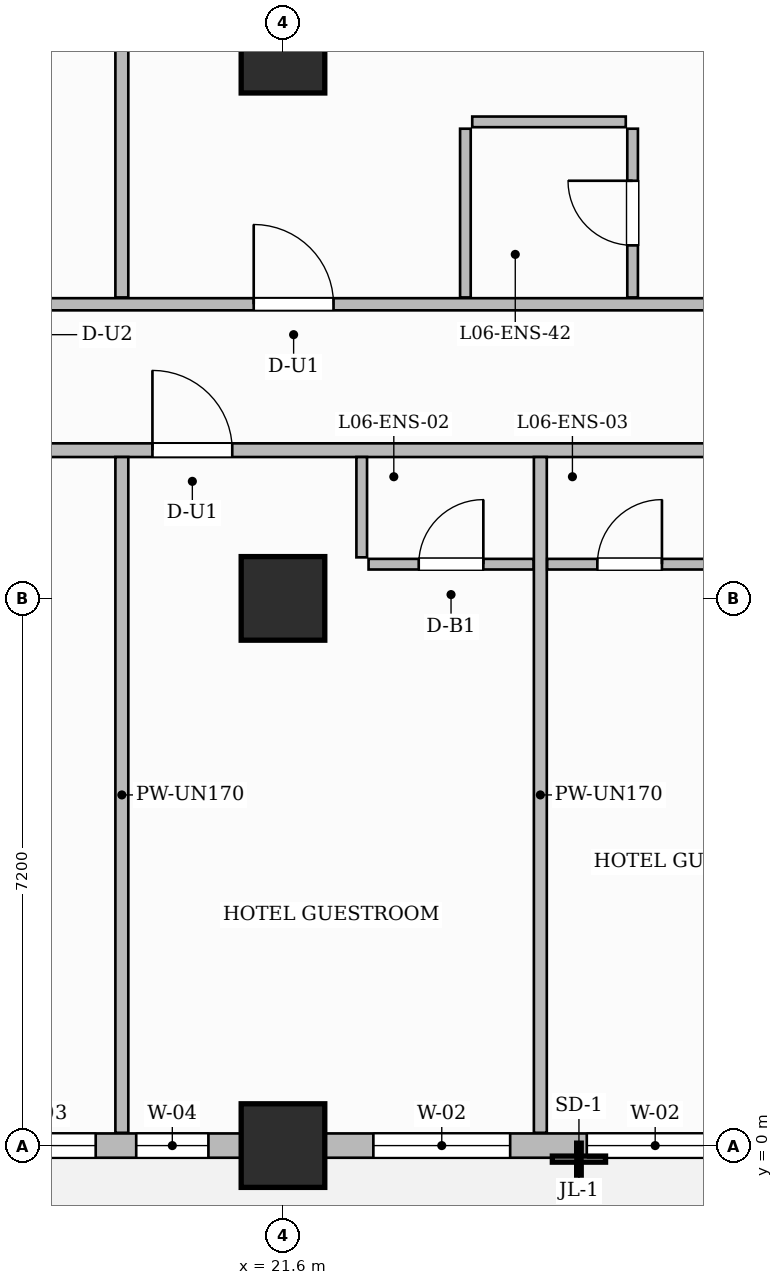
"""IFC4 building model, lengths in metres.
Left out: names, types, materials, properties, quantities, classifications, styles, units other than length and angle.
Written with IfcOpenShell. Run it as: python <this file> out.ifc"""

import sys

from ifc_helpers import new_model, si_unit, direction, frame, frame_2d, origin, origin_2d, place, context, subcontext, project, spatial, rectangle, extrude, source, transform, mapped, element, fill, save


model = new_model("IFC4")
c1 = context("Model", 3, precision=1e-05, world=origin(), true_north=direction((0.0, 1.0)))
c2 = subcontext(c1, "Body", "Model", "MODEL_VIEW")
j1 = project(units=[si_unit("LENGTHUNIT", "METRE"), si_unit("PLANEANGLEUNIT", "RADIAN")], contexts=[c1])
p1 = place(None, origin())
s1 = spatial("IfcSite", under=j1, at=p1, CompositionType="ELEMENT")
p2 = place(p1, origin())
s2 = spatial("IfcBuilding", under=s1, at=p2, CompositionType="ELEMENT")
p3 = place(p2, frame((0.0, 0.0, 32.4)))
s3 = spatial("IfcBuildingStorey", under=s2, at=p3, CompositionType="ELEMENT", Elevation=32.4)
m1 = source(origin(), c2, "Body", "SweptSolid", [
    extrude(rectangle(XDim=1.1, YDim=1.1, at=origin_2d()), origin(), (0.0, 0.0, 1.0), 3.7),
])
for number, where, z_axis, x_axis in (
    (1, (21.6, 0.0, 0.0), (0.0, 0.0, 1.0), (1.0, 0.0, 0.0)),
    (2, (21.6, 7.2, 0.0), (0.0, 0.0, 1.0), (1.0, 0.0, 0.0)),
    (3, (21.6, 14.4, 0.0), (0.0, 0.0, 1.0), (1.0, 0.0, 0.0)),
):
    element("IfcColumn", number, at=place(p3, frame(where, z_axis=z_axis, x_axis=x_axis)), inside=s3, PredefinedType="COLUMN", context=c2, shape_type="MappedRepresentation", body=[
        mapped(m1, transform((0.0, 0.0, 0.0), scale=1.0)),
    ])
p4 = place(p3, frame((14.568, 9.15, 0.0), z_axis=(0.0, 0.0, 1.0), x_axis=(1.0, 0.0, 0.0)))
e4 = element("IfcWall", 4, at=p4, inside=s3, PredefinedType="PARTITIONING", context=c2, shape_type="SweptSolid", body=[
    extrude(rectangle(XDim=15.542, YDim=0.18, at=frame_2d((7.771, 0.0))), origin(), (0.0, 0.0, 1.0), 3.45),
])
p5 = place(p4, frame((2.888, 0.0, 0.0)))
e5 = element("IfcOpeningElement", 5, at=p5, cuts=e4, PredefinedType="OPENING", context=c2, shape_type="SweptSolid", body=[
    extrude(rectangle(XDim=1.0, YDim=2.2, at=frame_2d((0.5, 1.1))), frame((0.0, 0.1, 0.0), z_axis=(0.0, -1.0, 0.0), x_axis=(1.0, 0.0, 0.0)), (0.0, 0.0, 1.0), 0.2),
])
p6 = place(p4, frame((5.314, 0.0, 0.0)))
e6 = element("IfcOpeningElement", 6, at=p6, cuts=e4, PredefinedType="OPENING", context=c2, shape_type="SweptSolid", body=[
    extrude(rectangle(XDim=1.05, YDim=2.25, at=frame_2d((0.525, 1.125))), frame((0.0, 0.1, 0.0), z_axis=(0.0, -1.0, 0.0), x_axis=(1.0, 0.0, 0.0)), (0.0, 0.0, 1.0), 0.2),
])
p7 = place(p4, frame((13.7, 0.0, 0.0)))
e7 = element("IfcOpeningElement", 7, at=p7, cuts=e4, PredefinedType="OPENING", context=c2, shape_type="SweptSolid", body=[
    extrude(rectangle(XDim=1.0, YDim=2.2, at=frame_2d((0.5, 1.1))), frame((0.0, 0.1, 0.0), z_axis=(0.0, -1.0, 0.0), x_axis=(1.0, 0.0, 0.0)), (0.0, 0.0, 1.0), 0.2),
])
p8 = place(p3, frame((14.568, 11.07, 0.0), z_axis=(0.0, 0.0, 1.0), x_axis=(1.0, 0.0, 0.0)))
e8 = element("IfcWall", 8, at=p8, inside=s3, PredefinedType="PARTITIONING", context=c2, shape_type="SweptSolid", body=[
    extrude(rectangle(XDim=15.542, YDim=0.16, at=frame_2d((7.771, 0.0))), origin(), (0.0, 0.0, 1.0), 3.45),
])
p9 = place(p8, frame((2.918, 0.0, 0.0)))
e9 = element("IfcOpeningElement", 9, at=p9, cuts=e8, PredefinedType="OPENING", context=c2, shape_type="SweptSolid", body=[
    extrude(rectangle(XDim=1.0, YDim=2.2, at=frame_2d((0.5, 1.1))), frame((0.0, 0.09, 0.0), z_axis=(0.0, -1.0, 0.0), x_axis=(1.0, 0.0, 0.0)), (0.0, 0.0, 1.0), 0.18),
])
p10 = place(p8, frame((6.647, 0.0, 0.0)))
e10 = element("IfcOpeningElement", 10, at=p10, cuts=e8, PredefinedType="OPENING", context=c2, shape_type="SweptSolid", body=[
    extrude(rectangle(XDim=1.05, YDim=2.25, at=frame_2d((0.525, 1.125))), frame((0.0, 0.09, 0.0), z_axis=(0.0, -1.0, 0.0), x_axis=(1.0, 0.0, 0.0)), (0.0, 0.0, 1.0), 0.18),
])
p11 = place(p3, frame((19.48, 0.168, 0.0), z_axis=(0.0, 0.0, 1.0), x_axis=(0.0, 1.0, 0.0)))
e11 = element("IfcWall", 11, at=p11, inside=s3, PredefinedType="PARTITIONING", context=c2, shape_type="SweptSolid", body=[
    extrude(rectangle(XDim=8.892, YDim=0.17, at=frame_2d((4.446, 0.0))), origin(), (0.0, 0.0, 1.0), 3.45),
])
p12 = place(p3, frame((24.986, 0.168, 0.0), z_axis=(0.0, 0.0, 1.0), x_axis=(0.0, 1.0, 0.0)))
e12 = element("IfcWall", 12, at=p12, inside=s3, PredefinedType="PARTITIONING", context=c2, shape_type="SweptSolid", body=[
    extrude(rectangle(XDim=8.892, YDim=0.17, at=frame_2d((4.446, 0.0))), origin(), (0.0, 0.0, 1.0), 3.035),
])
p13 = place(p3, frame((22.636, 7.74, 0.0), z_axis=(0.0, 0.0, 1.0), x_axis=(0.0, 1.0, 0.0)))
e13 = element("IfcWall", 13, at=p13, inside=s3, PredefinedType="PARTITIONING", context=c2, shape_type="SweptSolid", body=[
    extrude(rectangle(XDim=1.32, YDim=0.14, at=frame_2d((0.66, 0.0))), origin(), (0.0, 0.0, 1.0), 3.45),
])
p14 = place(p3, frame((22.726, 7.65, 0.0), z_axis=(0.0, 0.0, 1.0), x_axis=(1.0, 0.0, 0.0)))
e14 = element("IfcWall", 14, at=p14, inside=s3, PredefinedType="PARTITIONING", context=c2, shape_type="SweptSolid", body=[
    extrude(rectangle(XDim=2.17, YDim=0.14, at=frame_2d((1.085, 0.0))), origin(), (0.0, 0.0, 1.0), 3.45),
])
p15 = place(p14, frame((0.66, 0.0, 0.0)))
e15 = element("IfcOpeningElement", 15, at=p15, cuts=e14, PredefinedType="OPENING", context=c2, shape_type="SweptSolid", body=[
    extrude(rectangle(XDim=0.85, YDim=2.1, at=frame_2d((0.425, 1.05))), frame((0.0, 0.08, 0.0), z_axis=(0.0, -1.0, 0.0), x_axis=(1.0, 0.0, 0.0)), (0.0, 0.0, 1.0), 0.16),
])
p16 = place(p3, frame((25.076, 7.65, 0.0), z_axis=(0.0, 0.0, 1.0), x_axis=(1.0, 0.0, 0.0)))
e16 = element("IfcWall", 16, at=p16, inside=s3, PredefinedType="PARTITIONING", context=c2, shape_type="SweptSolid", body=[
    extrude(rectangle(XDim=2.17, YDim=0.14, at=frame_2d((1.085, 0.0))), origin(), (0.0, 0.0, 1.0), 3.45),
])
p17 = place(p16, frame((0.66, 0.0, 0.0)))
e17 = element("IfcOpeningElement", 17, at=p17, cuts=e16, PredefinedType="OPENING", context=c2, shape_type="SweptSolid", body=[
    extrude(rectangle(XDim=0.85, YDim=2.1, at=frame_2d((0.425, 1.05))), frame((0.0, 0.08, 0.0), z_axis=(0.0, -1.0, 0.0), x_axis=(1.0, 0.0, 0.0)), (0.0, 0.0, 1.0), 0.16),
])
p18 = place(p3, frame((19.48, 11.16, 0.0), z_axis=(0.0, 0.0, 1.0), x_axis=(0.0, 1.0, 0.0)))
e18 = element("IfcWall", 18, at=p18, inside=s3, PredefinedType="PARTITIONING", context=c2, shape_type="SweptSolid", body=[
    extrude(rectangle(XDim=10.272, YDim=0.17, at=frame_2d((5.136, 0.0))), origin(), (0.0, 0.0, 1.0), 3.45),
])
p19 = place(p3, frame((24.0, 11.16, 0.0), z_axis=(0.0, 0.0, 1.0), x_axis=(0.0, 1.0, 0.0)))
e19 = element("IfcWall", 19, at=p19, inside=s3, PredefinedType="PARTITIONING", context=c2, shape_type="SweptSolid", body=[
    extrude(rectangle(XDim=2.22, YDim=0.14, at=frame_2d((1.11, 0.0))), origin(), (0.0, 0.0, 1.0), 3.45),
])
p20 = place(p3, frame((26.2, 11.16, 0.0), z_axis=(0.0, 0.0, 1.0), x_axis=(0.0, 1.0, 0.0)))
e20 = element("IfcWall", 20, at=p20, inside=s3, PredefinedType="PARTITIONING", context=c2, shape_type="SweptSolid", body=[
    extrude(rectangle(XDim=2.22, YDim=0.14, at=frame_2d((1.11, 0.0))), origin(), (0.0, 0.0, 1.0), 3.45),
])
p21 = place(p20, frame((0.685, 0.0, 0.0)))
e21 = element("IfcOpeningElement", 21, at=p21, cuts=e20, PredefinedType="OPENING", context=c2, shape_type="SweptSolid", body=[
    extrude(rectangle(XDim=0.85, YDim=2.1, at=frame_2d((0.425, 1.05))), frame((0.0, 0.08, 0.0), z_axis=(0.0, -1.0, 0.0), x_axis=(1.0, 0.0, 0.0)), (0.0, 0.0, 1.0), 0.16),
])
p22 = place(p3, frame((24.09, 13.47, 0.0), z_axis=(0.0, 0.0, 1.0), x_axis=(1.0, 0.0, 0.0)))
e22 = element("IfcWall", 22, at=p22, inside=s3, PredefinedType="PARTITIONING", context=c2, shape_type="SweptSolid", body=[
    extrude(rectangle(XDim=2.02, YDim=0.14, at=frame_2d((1.01, 0.0))), origin(), (0.0, 0.0, 1.0), 3.45),
])
p23 = place(p3, frame((14.4, 0.0, 0.0), z_axis=(0.0, 0.0, 1.0), x_axis=(1.0, 0.0, 0.0)))
e23 = element("IfcWall", 23, at=p23, inside=s3, PredefinedType="SOLIDWALL", context=c2, shape_type="SweptSolid", body=[
    extrude(rectangle(XDim=43.2, YDim=0.32, at=frame_2d((21.6, 0.0))), origin(), (0.0, 0.0, 1.0), 2.885),
])
p24 = place(p23, frame((1.5, 0.0, 0.0)))
e24 = element("IfcOpeningElement", 24, at=p24, cuts=e23, PredefinedType="OPENING", context=c2, shape_type="SweptSolid", body=[
    extrude(rectangle(XDim=1.2, YDim=2.2, at=frame_2d((0.6, 1.1))), frame((0.0, 0.17, 0.0), z_axis=(0.0, -1.0, 0.0), x_axis=(1.0, 0.0, 0.0)), (0.0, 0.0, 1.0), 0.34),
])
p25 = place(p23, frame((3.336, 0.0, 0.8)))
e25 = element("IfcOpeningElement", 25, at=p25, cuts=e23, PredefinedType="OPENING", context=c2, shape_type="SweptSolid", body=[
    extrude(rectangle(XDim=1.4, YDim=1.85, at=frame_2d((0.7, 0.925))), frame((0.0, 0.17, 0.0), z_axis=(0.0, -1.0, 0.0), x_axis=(1.0, 0.0, 0.0)), (0.0, 0.0, 1.0), 0.34),
])
p26 = place(p23, frame((5.269, 0.0, 0.8)))
e26 = element("IfcOpeningElement", 26, at=p26, cuts=e23, PredefinedType="OPENING", context=c2, shape_type="SweptSolid", body=[
    extrude(rectangle(XDim=0.95, YDim=1.75, at=frame_2d((0.475, 0.875))), frame((0.0, 0.17, 0.0), z_axis=(0.0, -1.0, 0.0), x_axis=(1.0, 0.0, 0.0)), (0.0, 0.0, 1.0), 0.34),
])
p27 = place(p23, frame((8.389, 0.0, 0.8)))
e27 = element("IfcOpeningElement", 27, at=p27, cuts=e23, PredefinedType="OPENING", context=c2, shape_type="SweptSolid", body=[
    extrude(rectangle(XDim=1.8, YDim=1.85, at=frame_2d((0.9, 0.925))), frame((0.0, 0.17, 0.0), z_axis=(0.0, -1.0, 0.0), x_axis=(1.0, 0.0, 0.0)), (0.0, 0.0, 1.0), 0.34),
])
p28 = place(p23, frame((11.197, 0.0, 0.8)))
e28 = element("IfcOpeningElement", 28, at=p28, cuts=e23, PredefinedType="OPENING", context=c2, shape_type="SweptSolid", body=[
    extrude(rectangle(XDim=1.8, YDim=1.85, at=frame_2d((0.9, 0.925))), frame((0.0, 0.17, 0.0), z_axis=(0.0, -1.0, 0.0), x_axis=(1.0, 0.0, 0.0)), (0.0, 0.0, 1.0), 0.34),
])
p29 = place(p23, frame((16.804, 0.0, 0.8)))
e29 = element("IfcOpeningElement", 29, at=p29, cuts=e23, PredefinedType="OPENING", context=c2, shape_type="SweptSolid", body=[
    extrude(rectangle(XDim=1.8, YDim=1.85, at=frame_2d((0.9, 0.925))), frame((0.0, 0.17, 0.0), z_axis=(0.0, -1.0, 0.0), x_axis=(1.0, 0.0, 0.0)), (0.0, 0.0, 1.0), 0.34),
])
p30 = place(p23, frame((21.725, 0.0, 0.8)))
e30 = element("IfcOpeningElement", 30, at=p30, cuts=e23, PredefinedType="OPENING", context=c2, shape_type="SweptSolid", body=[
    extrude(rectangle(XDim=1.8, YDim=1.85, at=frame_2d((0.9, 0.925))), frame((0.0, 0.17, 0.0), z_axis=(0.0, -1.0, 0.0), x_axis=(1.0, 0.0, 0.0)), (0.0, 0.0, 1.0), 0.34),
])
p31 = place(p23, frame((24.475, 0.0, 0.8)))
e31 = element("IfcOpeningElement", 31, at=p31, cuts=e23, PredefinedType="OPENING", context=c2, shape_type="SweptSolid", body=[
    extrude(rectangle(XDim=1.8, YDim=1.85, at=frame_2d((0.9, 0.925))), frame((0.0, 0.17, 0.0), z_axis=(0.0, -1.0, 0.0), x_axis=(1.0, 0.0, 0.0)), (0.0, 0.0, 1.0), 0.34),
])
p32 = place(p23, frame((29.075, 0.0, 0.8)))
e32 = element("IfcOpeningElement", 32, at=p32, cuts=e23, PredefinedType="OPENING", context=c2, shape_type="SweptSolid", body=[
    extrude(rectangle(XDim=1.8, YDim=1.85, at=frame_2d((0.9, 0.925))), frame((0.0, 0.17, 0.0), z_axis=(0.0, -1.0, 0.0), x_axis=(1.0, 0.0, 0.0)), (0.0, 0.0, 1.0), 0.34),
])
p33 = place(p23, frame((32.125, 0.0, 0.8)))
e33 = element("IfcOpeningElement", 33, at=p33, cuts=e23, PredefinedType="OPENING", context=c2, shape_type="SweptSolid", body=[
    extrude(rectangle(XDim=1.8, YDim=1.85, at=frame_2d((0.9, 0.925))), frame((0.0, 0.17, 0.0), z_axis=(0.0, -1.0, 0.0), x_axis=(1.0, 0.0, 0.0)), (0.0, 0.0, 1.0), 0.34),
])
p34 = place(p23, frame((36.875, 0.0, 0.8)))
e34 = element("IfcOpeningElement", 34, at=p34, cuts=e23, PredefinedType="OPENING", context=c2, shape_type="SweptSolid", body=[
    extrude(rectangle(XDim=1.8, YDim=1.85, at=frame_2d((0.9, 0.925))), frame((0.0, 0.17, 0.0), z_axis=(0.0, -1.0, 0.0), x_axis=(1.0, 0.0, 0.0)), (0.0, 0.0, 1.0), 0.34),
])
p35 = place(p23, frame((39.925, 0.0, 0.8)))
e35 = element("IfcOpeningElement", 35, at=p35, cuts=e23, PredefinedType="OPENING", context=c2, shape_type="SweptSolid", body=[
    extrude(rectangle(XDim=1.8, YDim=1.85, at=frame_2d((0.9, 0.925))), frame((0.0, 0.17, 0.0), z_axis=(0.0, -1.0, 0.0), x_axis=(1.0, 0.0, 0.0)), (0.0, 0.0, 1.0), 0.34),
])
m2 = source(origin(), c2, "Body", "SweptSolid", [
    extrude(rectangle(XDim=0.85, YDim=2.1, at=frame_2d((0.425, 1.05))), frame((0.0, 0.025, 0.0), z_axis=(0.0, -1.0, 0.0), x_axis=(1.0, 0.0, 0.0)), (0.0, 0.0, 1.0), 0.05),
])
p36 = place(p15, origin())
e36 = element("IfcDoor", 36, at=p36, inside=s3, OperationType="SINGLE_SWING_RIGHT", PredefinedType="DOOR", context=c2, shape_type="MappedRepresentation", body=[
    mapped(m2, transform((0.0, 0.0, 0.0), scale=1.0)),
])
fill(e15, e36)
m3 = source(origin(), c2, "Body", "SweptSolid", [
    extrude(rectangle(XDim=1.05, YDim=2.25, at=frame_2d((0.525, 1.125))), frame((0.0, 0.025, 0.0), z_axis=(0.0, -1.0, 0.0), x_axis=(1.0, 0.0, 0.0)), (0.0, 0.0, 1.0), 0.05),
])
p37 = place(p6, origin())
e37 = element("IfcDoor", 37, at=p37, inside=s3, OperationType="SINGLE_SWING_LEFT", PredefinedType="DOOR", context=c2, shape_type="MappedRepresentation", body=[
    mapped(m3, transform((0.0, 0.0, 0.0), scale=1.0)),
])
fill(e6, e37)
p38 = place(p17, origin())
e38 = element("IfcDoor", 38, at=p38, inside=s3, OperationType="SINGLE_SWING_RIGHT", PredefinedType="DOOR", context=c2, shape_type="MappedRepresentation", body=[
    mapped(m2, transform((0.0, 0.0, 0.0), scale=1.0)),
])
fill(e17, e38)
p39 = place(p21, origin())
e39 = element("IfcDoor", 39, at=p39, inside=s3, OperationType="SINGLE_SWING_RIGHT", PredefinedType="DOOR", context=c2, shape_type="MappedRepresentation", body=[
    mapped(m2, transform((0.0, 0.0, 0.0), scale=1.0)),
])
fill(e21, e39)
p40 = place(p10, origin())
e40 = element("IfcDoor", 40, at=p40, inside=s3, OperationType="SINGLE_SWING_LEFT", PredefinedType="DOOR", context=c2, shape_type="MappedRepresentation", body=[
    mapped(m3, transform((0.0, 0.0, 0.0), scale=1.0)),
])
fill(e10, e40)
m4 = source(origin(), c2, "Body", "SweptSolid", [
    extrude(rectangle(XDim=1.4, YDim=1.85, at=frame_2d((0.7, 0.925))), frame((0.0, 0.03, 0.0), z_axis=(0.0, -1.0, 0.0), x_axis=(1.0, 0.0, 0.0)), (0.0, 0.0, 1.0), 0.06),
])
p41 = place(p25, origin())
e41 = element("IfcWindow", 41, at=p41, inside=s3, PartitioningType="SINGLE_PANEL", PredefinedType="WINDOW", context=c2, shape_type="MappedRepresentation", body=[
    mapped(m4, transform((0.0, 0.0, 0.0), scale=1.0)),
])
fill(e25, e41)
m5 = source(origin(), c2, "Body", "SweptSolid", [
    extrude(rectangle(XDim=0.95, YDim=1.75, at=frame_2d((0.475, 0.875))), frame((0.0, 0.03, 0.0), z_axis=(0.0, -1.0, 0.0), x_axis=(1.0, 0.0, 0.0)), (0.0, 0.0, 1.0), 0.06),
])
p42 = place(p26, origin())
e42 = element("IfcWindow", 42, at=p42, inside=s3, PartitioningType="SINGLE_PANEL", PredefinedType="WINDOW", context=c2, shape_type="MappedRepresentation", body=[
    mapped(m5, transform((0.0, 0.0, 0.0), scale=1.0)),
])
fill(e26, e42)
m6 = source(origin(), c2, "Body", "SweptSolid", [
    extrude(rectangle(XDim=1.8, YDim=1.85, at=frame_2d((0.9, 0.925))), frame((0.0, 0.03, 0.0), z_axis=(0.0, -1.0, 0.0), x_axis=(1.0, 0.0, 0.0)), (0.0, 0.0, 1.0), 0.06),
])
p43 = place(p27, origin())
e43 = element("IfcWindow", 43, at=p43, inside=s3, PartitioningType="DOUBLE_PANEL_VERTICAL", PredefinedType="WINDOW", context=c2, shape_type="MappedRepresentation", body=[
    mapped(m6, transform((0.0, 0.0, 0.0), scale=1.0)),
])
fill(e27, e43)
p44 = place(p28, origin())
e44 = element("IfcWindow", 44, at=p44, inside=s3, PartitioningType="DOUBLE_PANEL_VERTICAL", PredefinedType="WINDOW", context=c2, shape_type="MappedRepresentation", body=[
    mapped(m6, transform((0.0, 0.0, 0.0), scale=1.0)),
])
fill(e28, e44)
save(model, sys.argv[1])
